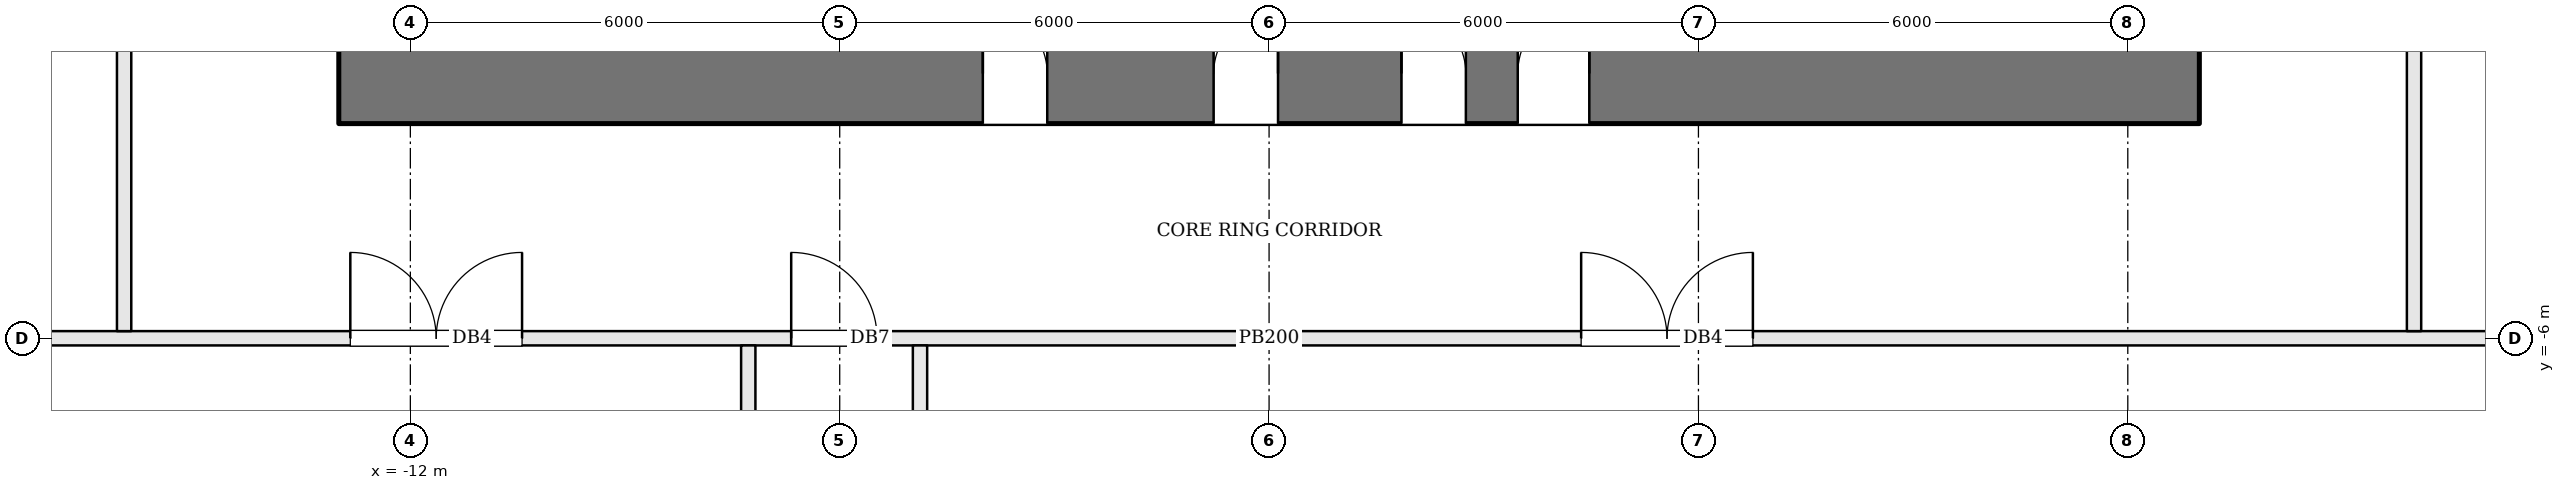
"""IFC4 building model, lengths in metres.
Left out: names, types, materials, properties, quantities, classifications, styles, units other than length and angle.
Written with IfcOpenShell. Run it as: python <this file> out.ifc"""

import sys

from ifc_helpers import new_model, si_unit, direction, frame, frame_2d, origin, place, context, subcontext, project, spatial, rectangle, extrude, element, fill, save


model = new_model("IFC4")
c1 = context("Model", 3, precision=1e-05, world=origin(), true_north=direction((0.0, 1.0)))
c2 = subcontext(c1, "Body", "Model", "MODEL_VIEW")
j1 = project(units=[si_unit("LENGTHUNIT", "METRE"), si_unit("PLANEANGLEUNIT", "RADIAN")], contexts=[c1])
p1 = place(None, origin())
s1 = spatial("IfcSite", under=j1, at=p1, CompositionType="ELEMENT")
p2 = place(p1, origin())
s2 = spatial("IfcBuilding", under=s1, at=p2, CompositionType="ELEMENT")
p3 = place(p2, frame((0.0, 0.0, 15.0)))
s3 = spatial("IfcBuildingStorey", under=s2, at=p3, CompositionType="ELEMENT", Elevation=15.0)
p4 = place(p3, frame((-13.0, -2.3, 0.0), z_axis=(0.0, 0.0, 1.0), x_axis=(1.0, 0.0, 0.0)))
e1 = element("IfcWall", 1, at=p4, inside=s3, PredefinedType="SHEAR", context=c2, shape_type="SweptSolid", body=[
    extrude(rectangle(XDim=26.0, YDim=1.4, at=frame_2d((13.0, 0.0))), origin(), (0.0, 0.0, 1.0), 7.8),
])
p5 = place(p4, frame((9.0, 0.0, 0.0)))
e2 = element("IfcOpeningElement", 2, at=p5, cuts=e1, PredefinedType="OPENING", context=c2, shape_type="SweptSolid", body=[
    extrude(rectangle(XDim=0.9, YDim=2.1, at=frame_2d((0.45, 1.05))), frame((0.0, 0.71, 0.0), z_axis=(0.0, -1.0, 0.0), x_axis=(1.0, 0.0, 0.0)), (0.0, 0.0, 1.0), 1.42),
])
p6 = place(p4, frame((12.225, 0.0, 0.0)))
e3 = element("IfcOpeningElement", 3, at=p6, cuts=e1, PredefinedType="OPENING", context=c2, shape_type="SweptSolid", body=[
    extrude(rectangle(XDim=0.9, YDim=2.1, at=frame_2d((0.45, 1.05))), frame((0.0, 0.71, 0.0), z_axis=(0.0, -1.0, 0.0), x_axis=(1.0, 0.0, 0.0)), (0.0, 0.0, 1.0), 1.42),
])
p7 = place(p4, frame((14.85, 0.0, 0.0)))
e4 = element("IfcOpeningElement", 4, at=p7, cuts=e1, PredefinedType="OPENING", context=c2, shape_type="SweptSolid", body=[
    extrude(rectangle(XDim=0.9, YDim=2.1, at=frame_2d((0.45, 1.05))), frame((0.0, 0.71, 0.0), z_axis=(0.0, -1.0, 0.0), x_axis=(1.0, 0.0, 0.0)), (0.0, 0.0, 1.0), 1.42),
])
p8 = place(p4, frame((16.475, 0.0, 0.0)))
e5 = element("IfcOpeningElement", 5, at=p8, cuts=e1, PredefinedType="OPENING", context=c2, shape_type="SweptSolid", body=[
    extrude(rectangle(XDim=1.0, YDim=2.1, at=frame_2d((0.5, 1.05))), frame((0.0, 0.71, 0.0), z_axis=(0.0, -1.0, 0.0), x_axis=(1.0, 0.0, 0.0)), (0.0, 0.0, 1.0), 1.42),
])
p9 = place(p3, frame((-19.85, -6.0, 0.0), z_axis=(0.0, 0.0, 1.0), x_axis=(1.0, 0.0, 0.0)))
e6 = element("IfcWall", 6, at=p9, inside=s3, PredefinedType="PARTITIONING", context=c2, shape_type="SweptSolid", body=[
    extrude(rectangle(XDim=39.7, YDim=0.2, at=frame_2d((19.85, 0.0))), origin(), (0.0, 0.0, 1.0), 6.83),
])
p10 = place(p9, frame((13.172, 0.0, 0.0)))
e7 = element("IfcOpeningElement", 7, at=p10, cuts=e6, PredefinedType="OPENING", context=c2, shape_type="SweptSolid", body=[
    extrude(rectangle(XDim=1.2, YDim=2.1, at=frame_2d((0.6, 1.05))), frame((0.0, 0.11, 0.0), z_axis=(0.0, -1.0, 0.0), x_axis=(1.0, 0.0, 0.0)), (0.0, 0.0, 1.0), 0.22),
])
p11 = place(p9, frame((24.211, 0.0, 0.0)))
e8 = element("IfcOpeningElement", 8, at=p11, cuts=e6, PredefinedType="OPENING", context=c2, shape_type="SweptSolid", body=[
    extrude(rectangle(XDim=2.4, YDim=2.4, at=frame_2d((1.2, 1.2))), frame((0.0, 0.11, 0.0), z_axis=(0.0, -1.0, 0.0), x_axis=(1.0, 0.0, 0.0)), (0.0, 0.0, 1.0), 0.22),
])
p12 = place(p9, frame((7.011, 0.0, 0.0)))
e9 = element("IfcOpeningElement", 9, at=p12, cuts=e6, PredefinedType="OPENING", context=c2, shape_type="SweptSolid", body=[
    extrude(rectangle(XDim=2.4, YDim=2.4, at=frame_2d((1.2, 1.2))), frame((0.0, 0.11, 0.0), z_axis=(0.0, -1.0, 0.0), x_axis=(1.0, 0.0, 0.0)), (0.0, 0.0, 1.0), 0.22),
])
p13 = place(p3, frame((-4.878, -6.1, 0.0), z_axis=(0.0, 0.0, 1.0), x_axis=(0.0, -1.0, 0.0)))
e10 = element("IfcWall", 10, at=p13, inside=s3, PredefinedType="PARTITIONING", context=c2, shape_type="SweptSolid", body=[
    extrude(rectangle(XDim=13.331, YDim=0.2, at=frame_2d((6.666, 0.0))), origin(), (0.0, 0.0, 1.0), 6.83),
])
p14 = place(p3, frame((-7.278, -19.231, 0.0), z_axis=(0.0, 0.0, 1.0), x_axis=(0.0, 1.0, 0.0)))
e11 = element("IfcWall", 11, at=p14, inside=s3, PredefinedType="PARTITIONING", context=c2, shape_type="SweptSolid", body=[
    extrude(rectangle(XDim=13.131, YDim=0.2, at=frame_2d((6.565, 0.0))), origin(), (0.0, 0.0, 1.0), 6.83),
])
p15 = place(p3, frame((-16.0, 14.9, 0.0), z_axis=(0.0, 0.0, 1.0), x_axis=(0.0, -1.0, 0.0)))
e12 = element("IfcWall", 12, at=p15, inside=s3, PredefinedType="PARTITIONING", context=c2, shape_type="SweptSolid", body=[
    extrude(rectangle(XDim=20.8, YDim=0.2, at=frame_2d((10.4, 0.0))), origin(), (0.0, 0.0, 1.0), 6.83),
])
p16 = place(p15, frame((9.9, 0.0, 0.0)))
e13 = element("IfcOpeningElement", 13, at=p16, cuts=e12, PredefinedType="OPENING", context=c2, shape_type="SweptSolid", body=[
    extrude(rectangle(XDim=1.0, YDim=2.1, at=frame_2d((0.5, 1.05))), frame((0.0, 0.11, 0.0), z_axis=(0.0, -1.0, 0.0), x_axis=(1.0, 0.0, 0.0)), (0.0, 0.0, 1.0), 0.22),
])
p17 = place(p3, frame((16.0, -5.9, 0.0), z_axis=(0.0, 0.0, 1.0), x_axis=(0.0, 1.0, 0.0)))
e14 = element("IfcWall", 14, at=p17, inside=s3, PredefinedType="PARTITIONING", context=c2, shape_type="SweptSolid", body=[
    extrude(rectangle(XDim=21.792, YDim=0.2, at=frame_2d((10.896, 0.0))), origin(), (0.0, 0.0, 1.0), 6.83),
])
p18 = place(p17, frame((9.9, 0.0, 0.0)))
e15 = element("IfcOpeningElement", 15, at=p18, cuts=e14, PredefinedType="OPENING", context=c2, shape_type="SweptSolid", body=[
    extrude(rectangle(XDim=1.0, YDim=2.1, at=frame_2d((0.5, 1.05))), frame((0.0, 0.11, 0.0), z_axis=(0.0, -1.0, 0.0), x_axis=(1.0, 0.0, 0.0)), (0.0, 0.0, 1.0), 0.22),
])
p19 = place(p5, origin())
e16 = element("IfcDoor", 16, at=p19, inside=s3, OperationType="SINGLE_SWING_LEFT", PredefinedType="DOOR", context=c2, shape_type="SweptSolid", body=[
    extrude(rectangle(XDim=0.9, YDim=2.1, at=frame_2d((0.45, 1.05))), frame((0.0, 0.025, 0.0), z_axis=(0.0, -1.0, 0.0), x_axis=(1.0, 0.0, 0.0)), (0.0, 0.0, 1.0), 0.05),
])
fill(e2, e16)
p20 = place(p6, origin())
e17 = element("IfcDoor", 17, at=p20, inside=s3, OperationType="SINGLE_SWING_RIGHT", PredefinedType="DOOR", context=c2, shape_type="SweptSolid", body=[
    extrude(rectangle(XDim=0.9, YDim=2.1, at=frame_2d((0.45, 1.05))), frame((0.0, 0.025, 0.0), z_axis=(0.0, -1.0, 0.0), x_axis=(1.0, 0.0, 0.0)), (0.0, 0.0, 1.0), 0.05),
])
fill(e3, e17)
p21 = place(p7, origin())
e18 = element("IfcDoor", 18, at=p21, inside=s3, OperationType="SINGLE_SWING_LEFT", PredefinedType="DOOR", context=c2, shape_type="SweptSolid", body=[
    extrude(rectangle(XDim=0.9, YDim=2.1, at=frame_2d((0.45, 1.05))), frame((0.0, 0.025, 0.0), z_axis=(0.0, -1.0, 0.0), x_axis=(1.0, 0.0, 0.0)), (0.0, 0.0, 1.0), 0.05),
])
fill(e4, e18)
p22 = place(p8, origin())
e19 = element("IfcDoor", 19, at=p22, inside=s3, OperationType="SINGLE_SWING_RIGHT", PredefinedType="DOOR", context=c2, shape_type="SweptSolid", body=[
    extrude(rectangle(XDim=1.0, YDim=2.1, at=frame_2d((0.5, 1.05))), frame((0.0, 0.025, 0.0), z_axis=(0.0, -1.0, 0.0), x_axis=(1.0, 0.0, 0.0)), (0.0, 0.0, 1.0), 0.05),
])
fill(e5, e19)
p23 = place(p10, origin())
e20 = element("IfcDoor", 20, at=p23, inside=s3, OperationType="SINGLE_SWING_LEFT", PredefinedType="DOOR", context=c2, shape_type="SweptSolid", body=[
    extrude(rectangle(XDim=1.2, YDim=2.1, at=frame_2d((0.6, 1.05))), frame((0.0, 0.025, 0.0), z_axis=(0.0, -1.0, 0.0), x_axis=(1.0, 0.0, 0.0)), (0.0, 0.0, 1.0), 0.05),
])
fill(e7, e20)
p24 = place(p11, origin())
e21 = element("IfcDoor", 21, at=p24, inside=s3, OperationType="DOUBLE_DOOR_SINGLE_SWING", PredefinedType="DOOR", context=c2, shape_type="SweptSolid", body=[
    extrude(rectangle(XDim=2.4, YDim=2.4, at=frame_2d((1.2, 1.2))), frame((0.0, 0.025, 0.0), z_axis=(0.0, -1.0, 0.0), x_axis=(1.0, 0.0, 0.0)), (0.0, 0.0, 1.0), 0.05),
])
fill(e8, e21)
p25 = place(p12, origin())
e22 = element("IfcDoor", 22, at=p25, inside=s3, OperationType="DOUBLE_DOOR_SINGLE_SWING", PredefinedType="DOOR", context=c2, shape_type="SweptSolid", body=[
    extrude(rectangle(XDim=2.4, YDim=2.4, at=frame_2d((1.2, 1.2))), frame((0.0, 0.025, 0.0), z_axis=(0.0, -1.0, 0.0), x_axis=(1.0, 0.0, 0.0)), (0.0, 0.0, 1.0), 0.05),
])
fill(e9, e22)
save(model, sys.argv[1])
